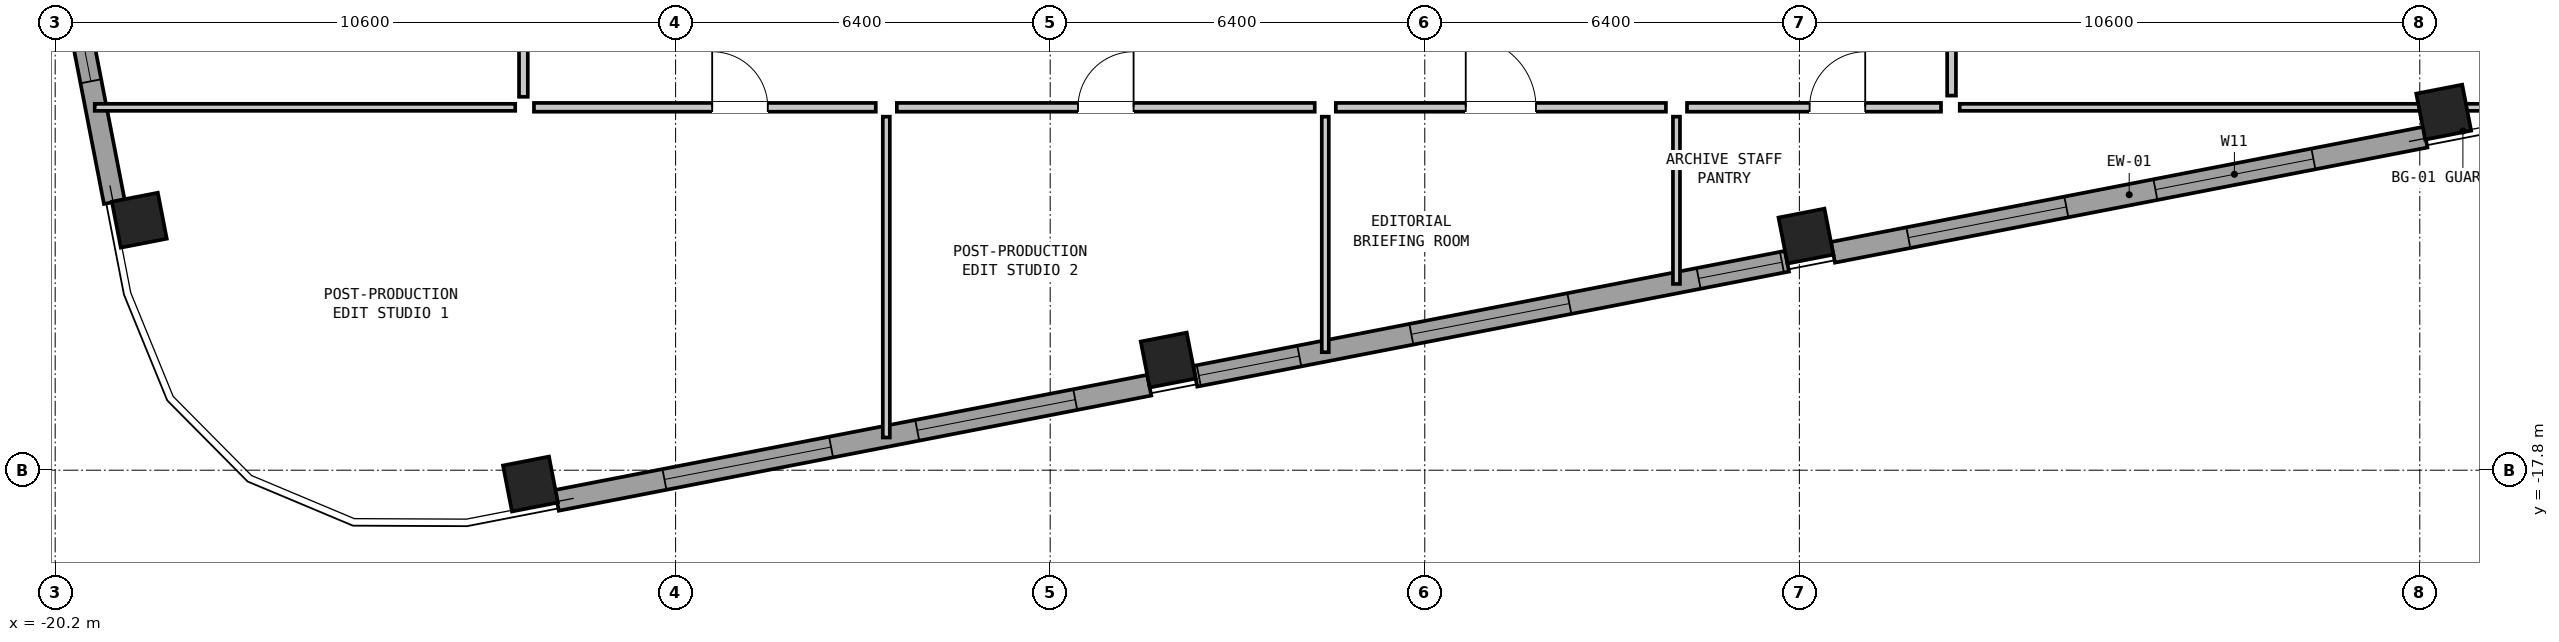
"""IFC4 building model, lengths in metres.
Left out: names, types, materials, properties, quantities, classifications, styles, units other than length and angle.
Written with IfcOpenShell. Run it as: python <this file> out.ifc"""

import sys

from ifc_helpers import new_model, si_unit, direction, frame, frame_2d, origin, origin_2d, place, context, subcontext, project, spatial, rectangle, hollow_rectangle, extrude, element, fill, save


model = new_model("IFC4")
c1 = context("Model", 3, precision=1e-05, world=origin(), true_north=direction((0.0, 1.0)))
c2 = subcontext(c1, "Body", "Model", "MODEL_VIEW")
j1 = project(units=[si_unit("LENGTHUNIT", "METRE"), si_unit("PLANEANGLEUNIT", "RADIAN")], contexts=[c1])
p1 = place(None, origin())
s1 = spatial("IfcSite", under=j1, at=p1, CompositionType="ELEMENT")
p2 = place(p1, origin())
s2 = spatial("IfcBuilding", under=s1, at=p2, CompositionType="ELEMENT")
p3 = place(p2, frame((0.0, 0.0, 134.15)))
s3 = spatial("IfcBuildingStorey", under=s2, at=p3, CompositionType="ELEMENT", Elevation=134.15)
for number, where, z_axis, x_axis in (
    (1, (-12.08, -18.036, 0.0), (0.0, 0.0, 1.0), (0.982, 0.191, 0.0)),
    (2, (-1.183, -15.918, 0.0), (0.0, 0.0, 1.0), (0.982, 0.191, 0.0)),
    (3, (9.713, -13.8, 0.0), (0.0, 0.0, 1.0), (0.982, 0.191, 0.0)),
    (4, (20.609, -11.682, 0.0), (0.0, 0.0, 1.0), (0.982, 0.191, 0.0)),
    (5, (-18.762, -13.529, 0.0), (0.0, 0.0, 1.0), (-0.191, 0.982, 0.0)),
):
    element("IfcColumn", number, at=place(p3, frame(where, z_axis=z_axis, x_axis=x_axis)), inside=s3, PredefinedType="COLUMN", context=c2, shape_type="SweptSolid", body=[
        extrude(hollow_rectangle(XDim=0.8, YDim=0.8, WallThickness=0.05, at=origin_2d()), origin(), (0.0, 0.0, 1.0), 3.05),
    ])
p4 = place(p3, frame((20.296, -12.11, 0.0), z_axis=(0.0, 0.0, 1.0), x_axis=(-0.981628941133, -0.190799952646, 0.0)))
e6 = element("IfcWall", 6, at=p4, inside=s3, PredefinedType="SOLIDWALL", context=c2, shape_type="SweptSolid", body=[
    extrude(rectangle(XDim=10.312, YDim=0.36, at=frame_2d((5.156, 0.0))), origin(), (0.0, 0.0, 1.0), 2.067),
])
p5 = place(p4, frame((1.95, 0.0, 0.2)))
e7 = element("IfcOpeningElement", 7, at=p5, cuts=e6, PredefinedType="OPENING", context=c2, shape_type="SweptSolid", body=[
    extrude(rectangle(XDim=2.75, YDim=0.95, at=frame_2d((1.375, 0.475))), frame((0.0, 0.192, 0.0), z_axis=(0.0, -1.0, 0.0), x_axis=(1.0, 0.0, 0.0)), (0.0, 0.0, 1.0), 0.384),
])
p6 = place(p4, frame((6.25, 0.0, 0.95)))
e8 = element("IfcOpeningElement", 8, at=p6, cuts=e6, PredefinedType="OPENING", context=c2, shape_type="SweptSolid", body=[
    extrude(rectangle(XDim=2.75, YDim=0.95, at=frame_2d((1.375, 0.475))), frame((0.0, 0.192, 0.0), z_axis=(0.0, -1.0, 0.0), x_axis=(1.0, 0.0, 0.0)), (0.0, 0.0, 1.0), 0.384),
])
p7 = place(p3, frame((9.389, -14.23, 0.0), z_axis=(0.0, 0.0, 1.0), x_axis=(-0.981627477005, -0.190807485147, 0.0)))
e9 = element("IfcWall", 9, at=p7, inside=s3, PredefinedType="SOLIDWALL", context=c2, shape_type="SweptSolid", body=[
    extrude(rectangle(XDim=10.3, YDim=0.36, at=frame_2d((5.15, 0.0))), origin(), (0.0, 0.0, 1.0), 2.067),
])
p8 = place(p7, frame((0.088, 0.0, 0.2)))
e10 = element("IfcOpeningElement", 10, at=p8, cuts=e9, PredefinedType="OPENING", context=c2, shape_type="SweptSolid", body=[
    extrude(rectangle(XDim=1.45, YDim=1.35, at=frame_2d((0.725, 0.675))), frame((0.0, 0.192, 0.0), z_axis=(0.0, -1.0, 0.0), x_axis=(1.0, 0.0, 0.0)), (0.0, 0.0, 1.0), 0.384),
])
p9 = place(p7, frame((3.788, 0.0, 0.95)))
e11 = element("IfcOpeningElement", 11, at=p9, cuts=e9, PredefinedType="OPENING", context=c2, shape_type="SweptSolid", body=[
    extrude(rectangle(XDim=2.75, YDim=0.95, at=frame_2d((1.375, 0.475))), frame((0.0, 0.192, 0.0), z_axis=(0.0, -1.0, 0.0), x_axis=(1.0, 0.0, 0.0)), (0.0, 0.0, 1.0), 0.384),
])
p10 = place(p7, frame((8.488, 0.0, 0.2)))
e12 = element("IfcOpeningElement", 12, at=p10, cuts=e9, PredefinedType="OPENING", context=c2, shape_type="SweptSolid", body=[
    extrude(rectangle(XDim=1.75, YDim=1.2, at=frame_2d((0.875, 0.6))), frame((0.0, 0.192, 0.0), z_axis=(0.0, -1.0, 0.0), x_axis=(1.0, 0.0, 0.0)), (0.0, 0.0, 1.0), 0.384),
])
p11 = place(p3, frame((-1.507, -16.348, 0.0), z_axis=(0.0, 0.0, 1.0), x_axis=(-0.981628941133, -0.190799952646, 0.0)))
e13 = element("IfcWall", 13, at=p11, inside=s3, PredefinedType="SOLIDWALL", context=c2, shape_type="SweptSolid", body=[
    extrude(rectangle(XDim=10.312, YDim=0.36, at=frame_2d((5.156, 0.0))), origin(), (0.0, 0.0, 1.0), 2.067),
])
p12 = place(p11, frame((1.288, 0.0, 0.95)))
e14 = element("IfcOpeningElement", 14, at=p12, cuts=e13, PredefinedType="OPENING", context=c2, shape_type="SweptSolid", body=[
    extrude(rectangle(XDim=2.75, YDim=0.95, at=frame_2d((1.375, 0.475))), frame((0.0, 0.192, 0.0), z_axis=(0.0, -1.0, 0.0), x_axis=(1.0, 0.0, 0.0)), (0.0, 0.0, 1.0), 0.384),
])
p13 = place(p11, frame((5.538, 0.0, 0.2)))
e15 = element("IfcOpeningElement", 15, at=p13, cuts=e13, PredefinedType="OPENING", context=c2, shape_type="SweptSolid", body=[
    extrude(rectangle(XDim=2.9, YDim=0.9, at=frame_2d((1.45, 0.45))), frame((0.0, 0.192, 0.0), z_axis=(0.0, -1.0, 0.0), x_axis=(1.0, 0.0, 0.0)), (0.0, 0.0, 1.0), 0.384),
])
p14 = place(p3, frame((-19.19, -13.217, 0.0), z_axis=(0.0, 0.0, 1.0), x_axis=(-0.190822765986, 0.981624506612, 0.0)))
e16 = element("IfcWall", 16, at=p14, inside=s3, PredefinedType="SOLIDWALL", context=c2, shape_type="SweptSolid", body=[
    extrude(rectangle(XDim=10.312, YDim=0.36, at=frame_2d((5.156, 0.0))), origin(), (0.0, 0.0, 1.0), 2.067),
])
p15 = place(p14, frame((2.1, 0.0, 0.2)))
e17 = element("IfcOpeningElement", 17, at=p15, cuts=e16, PredefinedType="OPENING", context=c2, shape_type="SweptSolid", body=[
    extrude(rectangle(XDim=2.45, YDim=1.1, at=frame_2d((1.225, 0.55))), frame((0.0, 0.192, 0.0), z_axis=(0.0, -1.0, 0.0), x_axis=(1.0, 0.0, 0.0)), (0.0, 0.0, 1.0), 0.384),
])
p16 = place(p14, frame((6.15, 0.0, 0.95)))
e18 = element("IfcOpeningElement", 18, at=p16, cuts=e16, PredefinedType="OPENING", context=c2, shape_type="SweptSolid", body=[
    extrude(rectangle(XDim=2.95, YDim=0.95, at=frame_2d((1.475, 0.475))), frame((0.0, 0.192, 0.0), z_axis=(0.0, -1.0, 0.0), x_axis=(1.0, 0.0, 0.0)), (0.0, 0.0, 1.0), 0.384),
])
p17 = place(p3, frame((-19.524, -11.6, 0.0), z_axis=(0.0, 0.0, 1.0), x_axis=(1.0, 0.0, 0.0)))
e19 = element("IfcWall", 19, at=p17, inside=s3, PredefinedType="PARTITIONING", context=c2, shape_type="SweptSolid", body=[
    extrude(rectangle(XDim=7.184, YDim=0.12, at=frame_2d((3.592, 0.0))), origin(), (0.0, 0.0, 1.0), 2.347),
])
p18 = place(p3, frame((12.34, -11.6, 0.0), z_axis=(0.0, 0.0, 1.0), x_axis=(1.0, 0.0, 0.0)))
e20 = element("IfcWall", 20, at=p18, inside=s3, PredefinedType="PARTITIONING", context=c2, shape_type="SweptSolid", body=[
    extrude(rectangle(XDim=10.066, YDim=0.12, at=frame_2d((5.033, 0.0))), origin(), (0.0, 0.0, 1.0), 2.127),
])
p19 = place(p3, frame((-6.0, -17.242, 0.0), z_axis=(0.0, 0.0, 1.0), x_axis=(0.0, 1.0, 0.0)))
e21 = element("IfcWall", 21, at=p19, inside=s3, PredefinedType="PARTITIONING", context=c2, shape_type="SweptSolid", body=[
    extrude(rectangle(XDim=5.482, YDim=0.12, at=frame_2d((2.741, 0.0))), origin(), (0.0, 0.0, 1.0), 2.347),
])
p20 = place(p3, frame((1.5, -15.784, 0.0), z_axis=(0.0, 0.0, 1.0), x_axis=(0.0, 1.0, 0.0)))
e22 = element("IfcWall", 22, at=p20, inside=s3, PredefinedType="PARTITIONING", context=c2, shape_type="SweptSolid", body=[
    extrude(rectangle(XDim=4.024, YDim=0.12, at=frame_2d((2.012, 0.0))), origin(), (0.0, 0.0, 1.0), 2.83),
])
p21 = place(p3, frame((7.5, -14.617, 0.0), z_axis=(0.0, 0.0, 1.0), x_axis=(0.0, 1.0, 0.0)))
e23 = element("IfcWall", 23, at=p21, inside=s3, PredefinedType="PARTITIONING", context=c2, shape_type="SweptSolid", body=[
    extrude(rectangle(XDim=2.857, YDim=0.12, at=frame_2d((1.429, 0.0))), origin(), (0.0, 0.0, 1.0), 2.83),
])
p22 = place(p3, frame((-12.02, -11.6, 0.0), z_axis=(0.0, 0.0, 1.0), x_axis=(1.0, 0.0, 0.0)))
e24 = element("IfcWall", 24, at=p22, inside=s3, PredefinedType="PARTITIONING", context=c2, shape_type="SweptSolid", body=[
    extrude(rectangle(XDim=5.84, YDim=0.15, at=frame_2d((2.92, 0.0))), origin(), (0.0, 0.0, 1.0), 2.347),
])
p23 = place(p22, frame((3.045, 0.0, 0.0)))
e25 = element("IfcOpeningElement", 25, at=p23, cuts=e24, PredefinedType="OPENING", context=c2, shape_type="SweptSolid", body=[
    extrude(rectangle(XDim=0.95, YDim=2.1, at=frame_2d((0.475, 1.05))), frame((0.0, 0.087, 0.0), z_axis=(0.0, -1.0, 0.0), x_axis=(1.0, 0.0, 0.0)), (0.0, 0.0, 1.0), 0.174),
])
p24 = place(p3, frame((-5.82, -11.6, 0.0), z_axis=(0.0, 0.0, 1.0), x_axis=(1.0, 0.0, 0.0)))
e26 = element("IfcWall", 26, at=p24, inside=s3, PredefinedType="PARTITIONING", context=c2, shape_type="SweptSolid", body=[
    extrude(rectangle(XDim=7.14, YDim=0.15, at=frame_2d((3.57, 0.0))), origin(), (0.0, 0.0, 1.0), 2.83),
])
p25 = place(p24, frame((3.095, 0.0, 0.0)))
e27 = element("IfcOpeningElement", 27, at=p25, cuts=e26, PredefinedType="OPENING", context=c2, shape_type="SweptSolid", body=[
    extrude(rectangle(XDim=0.95, YDim=2.1, at=frame_2d((0.475, 1.05))), frame((0.0, 0.087, 0.0), z_axis=(0.0, -1.0, 0.0), x_axis=(1.0, 0.0, 0.0)), (0.0, 0.0, 1.0), 0.174),
])
p26 = place(p3, frame((1.68, -11.6, 0.0), z_axis=(0.0, 0.0, 1.0), x_axis=(1.0, 0.0, 0.0)))
e28 = element("IfcWall", 28, at=p26, inside=s3, PredefinedType="PARTITIONING", context=c2, shape_type="SweptSolid", body=[
    extrude(rectangle(XDim=5.64, YDim=0.15, at=frame_2d((2.82, 0.0))), origin(), (0.0, 0.0, 1.0), 2.83),
])
p27 = place(p26, frame((2.22, 0.0, 0.0)))
e29 = element("IfcOpeningElement", 29, at=p27, cuts=e28, PredefinedType="OPENING", context=c2, shape_type="SweptSolid", body=[
    extrude(rectangle(XDim=1.2, YDim=2.1, at=frame_2d((0.6, 1.05))), frame((0.0, 0.087, 0.0), z_axis=(0.0, -1.0, 0.0), x_axis=(1.0, 0.0, 0.0)), (0.0, 0.0, 1.0), 0.174),
])
p28 = place(p3, frame((7.68, -11.6, 0.0), z_axis=(0.0, 0.0, 1.0), x_axis=(1.0, 0.0, 0.0)))
e30 = element("IfcWall", 30, at=p28, inside=s3, PredefinedType="PARTITIONING", context=c2, shape_type="SweptSolid", body=[
    extrude(rectangle(XDim=4.34, YDim=0.15, at=frame_2d((2.17, 0.0))), origin(), (0.0, 0.0, 1.0), 2.347),
])
p29 = place(p28, frame((2.095, 0.0, 0.0)))
e31 = element("IfcOpeningElement", 31, at=p29, cuts=e30, PredefinedType="OPENING", context=c2, shape_type="SweptSolid", body=[
    extrude(rectangle(XDim=0.95, YDim=2.1, at=frame_2d((0.475, 1.05))), frame((0.0, 0.087, 0.0), z_axis=(0.0, -1.0, 0.0), x_axis=(1.0, 0.0, 0.0)), (0.0, 0.0, 1.0), 0.174),
])
p30 = place(p3, frame((-12.2, -11.42, 0.0), z_axis=(0.0, 0.0, 1.0), x_axis=(0.0, 1.0, 0.0)))
e32 = element("IfcWall", 32, at=p30, inside=s3, PredefinedType="PARTITIONING", context=c2, shape_type="SweptSolid", body=[
    extrude(rectangle(XDim=8.24, YDim=0.15, at=frame_2d((4.12, 0.0))), origin(), (0.0, 0.0, 1.0), 2.83),
])
p31 = place(p30, frame((3.645, 0.0, 0.0)))
e33 = element("IfcOpeningElement", 33, at=p31, cuts=e32, PredefinedType="OPENING", context=c2, shape_type="SweptSolid", body=[
    extrude(rectangle(XDim=0.95, YDim=2.1, at=frame_2d((0.475, 1.05))), frame((0.0, 0.087, 0.0), z_axis=(0.0, -1.0, 0.0), x_axis=(1.0, 0.0, 0.0)), (0.0, 0.0, 1.0), 0.174),
])
p32 = place(p3, frame((12.2, -11.4, 0.0), z_axis=(0.0, 0.0, 1.0), x_axis=(0.0, 1.0, 0.0)))
e34 = element("IfcWall", 34, at=p32, inside=s3, PredefinedType="PARTITIONING", context=c2, shape_type="SweptSolid", body=[
    extrude(rectangle(XDim=8.84, YDim=0.15, at=frame_2d((4.42, 0.0))), origin(), (0.0, 0.0, 1.0), 2.83),
])
p33 = place(p32, frame((3.945, 0.0, 0.0)))
e35 = element("IfcOpeningElement", 35, at=p33, cuts=e34, PredefinedType="OPENING", context=c2, shape_type="SweptSolid", body=[
    extrude(rectangle(XDim=0.95, YDim=2.1, at=frame_2d((0.475, 1.05))), frame((0.0, 0.087, 0.0), z_axis=(0.0, -1.0, 0.0), x_axis=(1.0, 0.0, 0.0)), (0.0, 0.0, 1.0), 0.174),
])
p34 = place(p5, origin())
e36 = element("IfcWindow", 36, at=p34, inside=s3, PartitioningType="SINGLE_PANEL", PredefinedType="WINDOW", context=c2, shape_type="SweptSolid", body=[
    extrude(rectangle(XDim=2.75, YDim=0.95, at=frame_2d((1.375, 0.475))), frame((0.0, 0.03, 0.0), z_axis=(0.0, -1.0, 0.0), x_axis=(1.0, 0.0, 0.0)), (0.0, 0.0, 1.0), 0.06),
])
fill(e7, e36)
p35 = place(p6, origin())
e37 = element("IfcWindow", 37, at=p35, inside=s3, PartitioningType="SINGLE_PANEL", PredefinedType="WINDOW", context=c2, shape_type="SweptSolid", body=[
    extrude(rectangle(XDim=2.75, YDim=0.95, at=frame_2d((1.375, 0.475))), frame((0.0, 0.03, 0.0), z_axis=(0.0, -1.0, 0.0), x_axis=(1.0, 0.0, 0.0)), (0.0, 0.0, 1.0), 0.06),
])
fill(e8, e37)
p36 = place(p8, origin())
e38 = element("IfcWindow", 38, at=p36, inside=s3, PartitioningType="SINGLE_PANEL", PredefinedType="WINDOW", context=c2, shape_type="SweptSolid", body=[
    extrude(rectangle(XDim=1.45, YDim=1.35, at=frame_2d((0.725, 0.675))), frame((0.0, 0.03, 0.0), z_axis=(0.0, -1.0, 0.0), x_axis=(1.0, 0.0, 0.0)), (0.0, 0.0, 1.0), 0.06),
])
fill(e10, e38)
p37 = place(p9, origin())
e39 = element("IfcWindow", 39, at=p37, inside=s3, PartitioningType="SINGLE_PANEL", PredefinedType="WINDOW", context=c2, shape_type="SweptSolid", body=[
    extrude(rectangle(XDim=2.75, YDim=0.95, at=frame_2d((1.375, 0.475))), frame((0.0, 0.03, 0.0), z_axis=(0.0, -1.0, 0.0), x_axis=(1.0, 0.0, 0.0)), (0.0, 0.0, 1.0), 0.06),
])
fill(e11, e39)
p38 = place(p10, origin())
e40 = element("IfcWindow", 40, at=p38, inside=s3, PartitioningType="SINGLE_PANEL", PredefinedType="WINDOW", context=c2, shape_type="SweptSolid", body=[
    extrude(rectangle(XDim=1.75, YDim=1.2, at=frame_2d((0.875, 0.6))), frame((0.0, 0.03, 0.0), z_axis=(0.0, -1.0, 0.0), x_axis=(1.0, 0.0, 0.0)), (0.0, 0.0, 1.0), 0.06),
])
fill(e12, e40)
p39 = place(p12, origin())
e41 = element("IfcWindow", 41, at=p39, inside=s3, PartitioningType="SINGLE_PANEL", PredefinedType="WINDOW", context=c2, shape_type="SweptSolid", body=[
    extrude(rectangle(XDim=2.75, YDim=0.95, at=frame_2d((1.375, 0.475))), frame((0.0, 0.03, 0.0), z_axis=(0.0, -1.0, 0.0), x_axis=(1.0, 0.0, 0.0)), (0.0, 0.0, 1.0), 0.06),
])
fill(e14, e41)
p40 = place(p13, origin())
e42 = element("IfcWindow", 42, at=p40, inside=s3, PartitioningType="SINGLE_PANEL", PredefinedType="WINDOW", context=c2, shape_type="SweptSolid", body=[
    extrude(rectangle(XDim=2.9, YDim=0.9, at=frame_2d((1.45, 0.45))), frame((0.0, 0.03, 0.0), z_axis=(0.0, -1.0, 0.0), x_axis=(1.0, 0.0, 0.0)), (0.0, 0.0, 1.0), 0.06),
])
fill(e15, e42)
p41 = place(p15, origin())
e43 = element("IfcWindow", 43, at=p41, inside=s3, PartitioningType="SINGLE_PANEL", PredefinedType="WINDOW", context=c2, shape_type="SweptSolid", body=[
    extrude(rectangle(XDim=2.45, YDim=1.1, at=frame_2d((1.225, 0.55))), frame((0.0, 0.03, 0.0), z_axis=(0.0, -1.0, 0.0), x_axis=(1.0, 0.0, 0.0)), (0.0, 0.0, 1.0), 0.06),
])
fill(e17, e43)
p42 = place(p23, origin())
e44 = element("IfcDoor", 44, at=p42, inside=s3, OperationType="SINGLE_SWING_LEFT", PredefinedType="DOOR", context=c2, shape_type="SweptSolid", body=[
    extrude(rectangle(XDim=0.95, YDim=2.1, at=frame_2d((0.475, 1.05))), frame((0.0, 0.025, 0.0), z_axis=(0.0, -1.0, 0.0), x_axis=(1.0, 0.0, 0.0)), (0.0, 0.0, 1.0), 0.05),
])
fill(e25, e44)
p43 = place(p25, origin())
e45 = element("IfcDoor", 45, at=p43, inside=s3, OperationType="SINGLE_SWING_RIGHT", PredefinedType="DOOR", context=c2, shape_type="SweptSolid", body=[
    extrude(rectangle(XDim=0.95, YDim=2.1, at=frame_2d((0.475, 1.05))), frame((0.0, 0.025, 0.0), z_axis=(0.0, -1.0, 0.0), x_axis=(1.0, 0.0, 0.0)), (0.0, 0.0, 1.0), 0.05),
])
fill(e27, e45)
p44 = place(p27, origin())
e46 = element("IfcDoor", 46, at=p44, inside=s3, OperationType="SINGLE_SWING_LEFT", PredefinedType="DOOR", context=c2, shape_type="SweptSolid", body=[
    extrude(rectangle(XDim=1.2, YDim=2.1, at=frame_2d((0.6, 1.05))), frame((0.0, 0.025, 0.0), z_axis=(0.0, -1.0, 0.0), x_axis=(1.0, 0.0, 0.0)), (0.0, 0.0, 1.0), 0.05),
])
fill(e29, e46)
p45 = place(p29, origin())
e47 = element("IfcDoor", 47, at=p45, inside=s3, OperationType="SINGLE_SWING_RIGHT", PredefinedType="DOOR", context=c2, shape_type="SweptSolid", body=[
    extrude(rectangle(XDim=0.95, YDim=2.1, at=frame_2d((0.475, 1.05))), frame((0.0, 0.025, 0.0), z_axis=(0.0, -1.0, 0.0), x_axis=(1.0, 0.0, 0.0)), (0.0, 0.0, 1.0), 0.05),
])
fill(e31, e47)
save(model, sys.argv[1])
